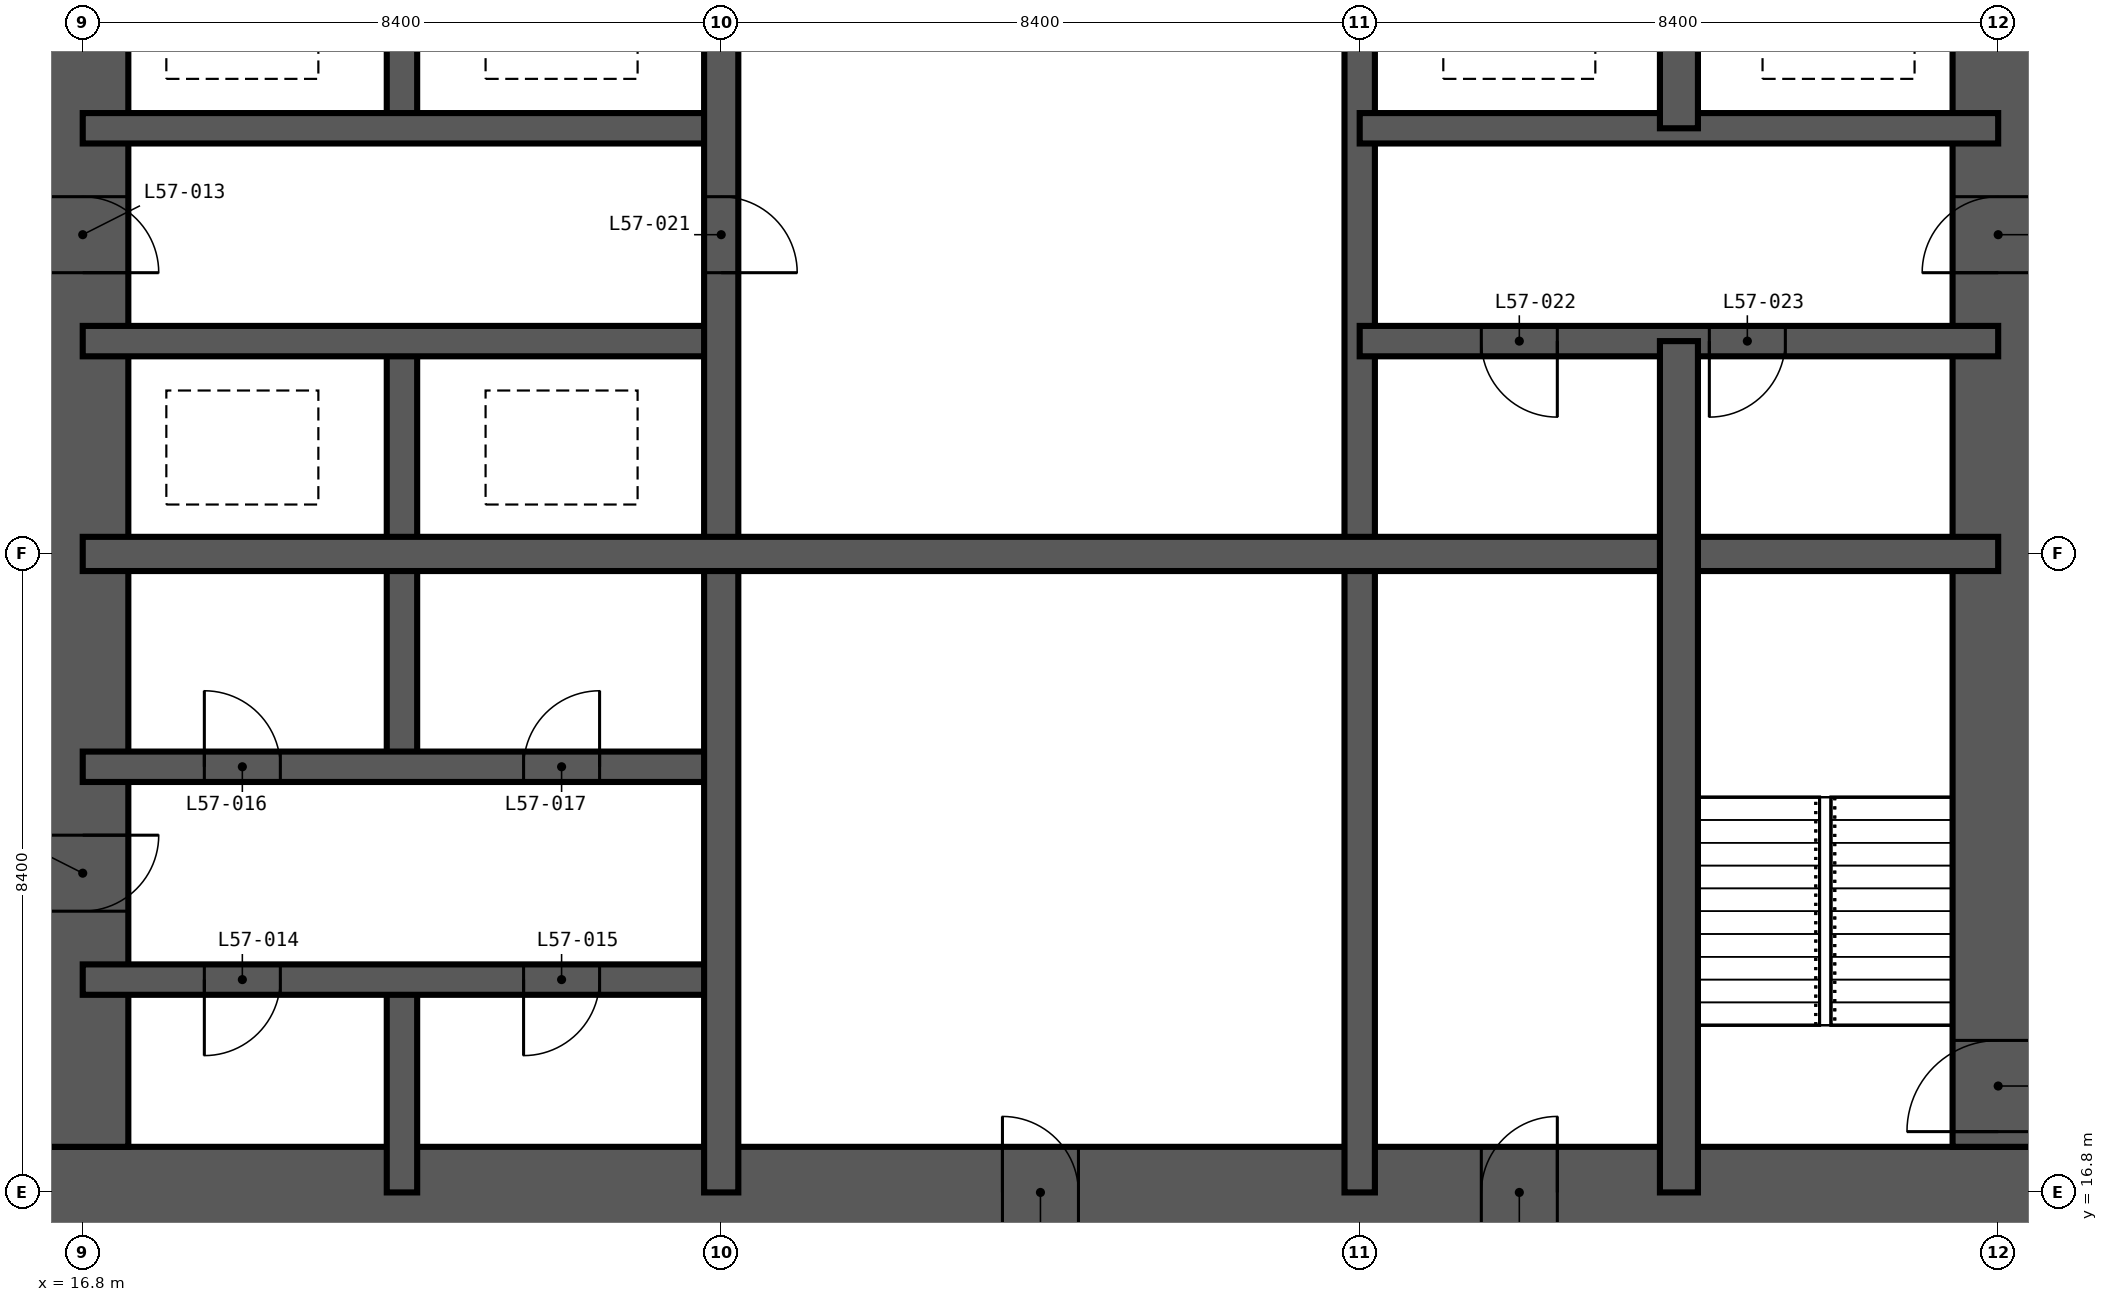
"""IFC4 building model, lengths in metres.
Left out: names, types, materials, properties, quantities, classifications, styles, units other than length and angle.
Written with IfcOpenShell. Run it as: python <this file> out.ifc"""

import sys

from ifc_helpers import new_model, si_unit, direction, frame, frame_2d, origin, place, context, subcontext, project, spatial, rectangle, extrude, element, fill, save


model = new_model("IFC4")
c1 = context("Model", 3, precision=1e-05, world=origin(), true_north=direction((0.0, 1.0)))
c2 = subcontext(c1, "Body", "Model", "MODEL_VIEW")
j1 = project(units=[si_unit("LENGTHUNIT", "METRE"), si_unit("PLANEANGLEUNIT", "RADIAN")], contexts=[c1])
p1 = place(None, origin())
s1 = spatial("IfcSite", under=j1, at=p1, CompositionType="ELEMENT")
p2 = place(p1, origin())
s2 = spatial("IfcBuilding", under=s1, at=p2, CompositionType="ELEMENT")
p3 = place(p2, frame((0.0, 0.0, 220.2)))
s3 = spatial("IfcBuildingStorey", under=s2, at=p3, CompositionType="ELEMENT", Elevation=220.2)
p4 = place(p3, frame((16.2, 16.8, -0.4), z_axis=(0.0, 0.0, 1.0), x_axis=(1.0, 0.0, 0.0)))
e1 = element("IfcWall", 1, at=p4, inside=s3, PredefinedType="SHEAR", context=c2, shape_type="SweptSolid", body=[
    extrude(rectangle(XDim=26.4, YDim=1.2, at=frame_2d((13.2, 0.0))), origin(), (0.0, 0.0, 1.0), 5.45),
])
p5 = place(p4, frame((12.7, 0.0, 0.4)))
e2 = element("IfcOpeningElement", 2, at=p5, cuts=e1, PredefinedType="OPENING", context=c2, shape_type="SweptSolid", body=[
    extrude(rectangle(XDim=1.0, YDim=2.1, at=frame_2d((0.5, 1.05))), frame((0.0, 0.61, 0.0), z_axis=(0.0, -1.0, 0.0), x_axis=(1.0, 0.0, 0.0)), (0.0, 0.0, 1.0), 1.22),
])
p6 = place(p4, frame((19.0, 0.0, 0.4)))
e3 = element("IfcOpeningElement", 3, at=p6, cuts=e1, PredefinedType="OPENING", context=c2, shape_type="SweptSolid", body=[
    extrude(rectangle(XDim=1.0, YDim=2.1, at=frame_2d((0.5, 1.05))), frame((0.0, 0.61, 0.0), z_axis=(0.0, -1.0, 0.0), x_axis=(1.0, 0.0, 0.0)), (0.0, 0.0, 1.0), 1.22),
])
p7 = place(p3, frame((42.0, 17.4, -0.4), z_axis=(0.0, 0.0, 1.0), x_axis=(0.0, 1.0, 0.0)))
e4 = element("IfcWall", 4, at=p7, inside=s3, PredefinedType="SHEAR", context=c2, shape_type="SweptSolid", body=[
    extrude(rectangle(XDim=24.0, YDim=1.2, at=frame_2d((12.0, 0.0))), origin(), (0.0, 0.0, 1.0), 5.45),
])
p8 = place(p7, frame((0.2, 0.0, 0.4)))
e5 = element("IfcOpeningElement", 5, at=p8, cuts=e4, PredefinedType="OPENING", context=c2, shape_type="SweptSolid", body=[
    extrude(rectangle(XDim=1.2, YDim=2.2, at=frame_2d((0.6, 1.1))), frame((0.0, 0.61, 0.0), z_axis=(0.0, -1.0, 0.0), x_axis=(1.0, 0.0, 0.0)), (0.0, 0.0, 1.0), 1.22),
])
p9 = place(p7, frame((11.5, 0.0, 0.4)))
e6 = element("IfcOpeningElement", 6, at=p9, cuts=e4, PredefinedType="OPENING", context=c2, shape_type="SweptSolid", body=[
    extrude(rectangle(XDim=1.0, YDim=2.1, at=frame_2d((0.5, 1.05))), frame((0.0, 0.61, 0.0), z_axis=(0.0, -1.0, 0.0), x_axis=(1.0, 0.0, 0.0)), (0.0, 0.0, 1.0), 1.22),
])
p10 = place(p7, frame((19.9, 0.0, 0.4)))
e7 = element("IfcOpeningElement", 7, at=p10, cuts=e4, PredefinedType="OPENING", context=c2, shape_type="SweptSolid", body=[
    extrude(rectangle(XDim=1.0, YDim=2.1, at=frame_2d((0.5, 1.05))), frame((0.0, 0.61, 0.0), z_axis=(0.0, -1.0, 0.0), x_axis=(1.0, 0.0, 0.0)), (0.0, 0.0, 1.0), 1.22),
])
p11 = place(p3, frame((16.8, 41.4, -0.4), z_axis=(0.0, 0.0, 1.0), x_axis=(0.0, -1.0, 0.0)))
e8 = element("IfcWall", 8, at=p11, inside=s3, PredefinedType="SHEAR", context=c2, shape_type="SweptSolid", body=[
    extrude(rectangle(XDim=24.0, YDim=1.2, at=frame_2d((12.0, 0.0))), origin(), (0.0, 0.0, 1.0), 5.45),
])
p12 = place(p11, frame((11.5, 0.0, 0.4)))
e9 = element("IfcOpeningElement", 9, at=p12, cuts=e8, PredefinedType="OPENING", context=c2, shape_type="SweptSolid", body=[
    extrude(rectangle(XDim=1.0, YDim=2.1, at=frame_2d((0.5, 1.05))), frame((0.0, 0.61, 0.0), z_axis=(0.0, -1.0, 0.0), x_axis=(1.0, 0.0, 0.0)), (0.0, 0.0, 1.0), 1.22),
])
p13 = place(p11, frame((19.9, 0.0, 0.4)))
e10 = element("IfcOpeningElement", 10, at=p13, cuts=e8, PredefinedType="OPENING", context=c2, shape_type="SweptSolid", body=[
    extrude(rectangle(XDim=1.0, YDim=2.1, at=frame_2d((0.5, 1.05))), frame((0.0, 0.61, 0.0), z_axis=(0.0, -1.0, 0.0), x_axis=(1.0, 0.0, 0.0)), (0.0, 0.0, 1.0), 1.22),
])
p14 = place(p11, frame((5.2, 0.0, 0.4)))
e11 = element("IfcOpeningElement", 11, at=p14, cuts=e8, PredefinedType="OPENING", context=c2, shape_type="SweptSolid", body=[
    extrude(rectangle(XDim=1.0, YDim=2.1, at=frame_2d((0.5, 1.05))), frame((0.0, 0.61, 0.0), z_axis=(0.0, -1.0, 0.0), x_axis=(1.0, 0.0, 0.0)), (0.0, 0.0, 1.0), 1.22),
])
p15 = place(p3, frame((21.0, 16.8, -0.4), z_axis=(0.0, 0.0, 1.0), x_axis=(0.0, 1.0, 0.0)))
e12 = element("IfcWall", 12, at=p15, inside=s3, PredefinedType="SHEAR", context=c2, shape_type="SweptSolid", body=[
    extrude(rectangle(XDim=2.8, YDim=0.4, at=frame_2d((1.4, 0.0))), origin(), (0.0, 0.0, 1.0), 5.45),
])
p16 = place(p3, frame((21.0, 22.4, -0.4), z_axis=(0.0, 0.0, 1.0), x_axis=(0.0, 1.0, 0.0)))
e13 = element("IfcWall", 13, at=p16, inside=s3, PredefinedType="SHEAR", context=c2, shape_type="SweptSolid", body=[
    extrude(rectangle(XDim=5.6, YDim=0.4, at=frame_2d((2.8, 0.0))), origin(), (0.0, 0.0, 1.0), 5.45),
])
p17 = place(p3, frame((21.0, 30.8, -0.4), z_axis=(0.0, 0.0, 1.0), x_axis=(0.0, 1.0, 0.0)))
e14 = element("IfcWall", 14, at=p17, inside=s3, PredefinedType="SHEAR", context=c2, shape_type="SweptSolid", body=[
    extrude(rectangle(XDim=2.8, YDim=0.4, at=frame_2d((1.4, 0.0))), origin(), (0.0, 0.0, 1.0), 5.45),
])
p18 = place(p3, frame((33.6, 16.8, -0.4), z_axis=(0.0, 0.0, 1.0), x_axis=(0.0, 1.0, 0.0)))
e15 = element("IfcWall", 15, at=p18, inside=s3, PredefinedType="SHEAR", context=c2, shape_type="SweptSolid", body=[
    extrude(rectangle(XDim=25.2, YDim=0.4, at=frame_2d((12.6, 0.0))), origin(), (0.0, 0.0, 1.0), 5.45),
])
p19 = place(p18, frame((22.5, 0.0, 0.4)))
e16 = element("IfcOpeningElement", 16, at=p19, cuts=e15, PredefinedType="OPENING", context=c2, shape_type="SweptSolid", body=[
    extrude(rectangle(XDim=1.2, YDim=2.2, at=frame_2d((0.6, 1.1))), frame((0.0, 0.21, 0.0), z_axis=(0.0, -1.0, 0.0), x_axis=(1.0, 0.0, 0.0)), (0.0, 0.0, 1.0), 0.42),
])
p20 = place(p18, frame((18.3, 0.0, 0.4)))
e17 = element("IfcOpeningElement", 17, at=p20, cuts=e15, PredefinedType="OPENING", context=c2, shape_type="SweptSolid", body=[
    extrude(rectangle(XDim=1.2, YDim=2.2, at=frame_2d((0.6, 1.1))), frame((0.0, 0.21, 0.0), z_axis=(0.0, -1.0, 0.0), x_axis=(1.0, 0.0, 0.0)), (0.0, 0.0, 1.0), 0.42),
])
p21 = place(p3, frame((16.8, 19.6, -0.4), z_axis=(0.0, 0.0, 1.0), x_axis=(1.0, 0.0, 0.0)))
e18 = element("IfcWall", 18, at=p21, inside=s3, PredefinedType="SHEAR", context=c2, shape_type="SweptSolid", body=[
    extrude(rectangle(XDim=8.4, YDim=0.4, at=frame_2d((4.2, 0.0))), origin(), (0.0, 0.0, 1.0), 5.45),
])
p22 = place(p21, frame((1.6, 0.0, 0.4)))
e19 = element("IfcOpeningElement", 19, at=p22, cuts=e18, PredefinedType="OPENING", context=c2, shape_type="SweptSolid", body=[
    extrude(rectangle(XDim=1.0, YDim=2.1, at=frame_2d((0.5, 1.05))), frame((0.0, 0.21, 0.0), z_axis=(0.0, -1.0, 0.0), x_axis=(1.0, 0.0, 0.0)), (0.0, 0.0, 1.0), 0.42),
])
p23 = place(p21, frame((5.8, 0.0, 0.4)))
e20 = element("IfcOpeningElement", 20, at=p23, cuts=e18, PredefinedType="OPENING", context=c2, shape_type="SweptSolid", body=[
    extrude(rectangle(XDim=1.0, YDim=2.1, at=frame_2d((0.5, 1.05))), frame((0.0, 0.21, 0.0), z_axis=(0.0, -1.0, 0.0), x_axis=(1.0, 0.0, 0.0)), (0.0, 0.0, 1.0), 0.42),
])
p24 = place(p3, frame((16.8, 22.4, -0.4), z_axis=(0.0, 0.0, 1.0), x_axis=(1.0, 0.0, 0.0)))
e21 = element("IfcWall", 21, at=p24, inside=s3, PredefinedType="SHEAR", context=c2, shape_type="SweptSolid", body=[
    extrude(rectangle(XDim=8.4, YDim=0.4, at=frame_2d((4.2, 0.0))), origin(), (0.0, 0.0, 1.0), 5.45),
])
p25 = place(p24, frame((1.6, 0.0, 0.4)))
e22 = element("IfcOpeningElement", 22, at=p25, cuts=e21, PredefinedType="OPENING", context=c2, shape_type="SweptSolid", body=[
    extrude(rectangle(XDim=1.0, YDim=2.1, at=frame_2d((0.5, 1.05))), frame((0.0, 0.21, 0.0), z_axis=(0.0, -1.0, 0.0), x_axis=(1.0, 0.0, 0.0)), (0.0, 0.0, 1.0), 0.42),
])
p26 = place(p24, frame((5.8, 0.0, 0.4)))
e23 = element("IfcOpeningElement", 23, at=p26, cuts=e21, PredefinedType="OPENING", context=c2, shape_type="SweptSolid", body=[
    extrude(rectangle(XDim=1.0, YDim=2.1, at=frame_2d((0.5, 1.05))), frame((0.0, 0.21, 0.0), z_axis=(0.0, -1.0, 0.0), x_axis=(1.0, 0.0, 0.0)), (0.0, 0.0, 1.0), 0.42),
])
p27 = place(p3, frame((16.8, 28.0, -0.4), z_axis=(0.0, 0.0, 1.0), x_axis=(1.0, 0.0, 0.0)))
e24 = element("IfcWall", 24, at=p27, inside=s3, PredefinedType="SHEAR", context=c2, shape_type="SweptSolid", body=[
    extrude(rectangle(XDim=8.4, YDim=0.4, at=frame_2d((4.2, 0.0))), origin(), (0.0, 0.0, 1.0), 5.45),
])
p28 = place(p3, frame((33.6, 28.0, -0.4), z_axis=(0.0, 0.0, 1.0), x_axis=(1.0, 0.0, 0.0)))
e25 = element("IfcWall", 25, at=p28, inside=s3, PredefinedType="SHEAR", context=c2, shape_type="SweptSolid", body=[
    extrude(rectangle(XDim=8.4, YDim=0.4, at=frame_2d((4.2, 0.0))), origin(), (0.0, 0.0, 1.0), 5.45),
])
p29 = place(p28, frame((1.6, 0.0, 0.4)))
e26 = element("IfcOpeningElement", 26, at=p29, cuts=e25, PredefinedType="OPENING", context=c2, shape_type="SweptSolid", body=[
    extrude(rectangle(XDim=1.0, YDim=2.1, at=frame_2d((0.5, 1.05))), frame((0.0, 0.21, 0.0), z_axis=(0.0, -1.0, 0.0), x_axis=(1.0, 0.0, 0.0)), (0.0, 0.0, 1.0), 0.42),
])
p30 = place(p28, frame((4.6, 0.0, 0.4)))
e27 = element("IfcOpeningElement", 27, at=p30, cuts=e25, PredefinedType="OPENING", context=c2, shape_type="SweptSolid", body=[
    extrude(rectangle(XDim=1.0, YDim=2.1, at=frame_2d((0.5, 1.05))), frame((0.0, 0.21, 0.0), z_axis=(0.0, -1.0, 0.0), x_axis=(1.0, 0.0, 0.0)), (0.0, 0.0, 1.0), 0.42),
])
for number, where, z_axis, x_axis in (
    (28, (16.8, 30.8, -0.4), (0.0, 0.0, 1.0), (1.0, 0.0, 0.0)),
    (29, (33.6, 30.8, -0.4), (0.0, 0.0, 1.0), (1.0, 0.0, 0.0)),
):
    element("IfcWall", number, at=place(p3, frame(where, z_axis=z_axis, x_axis=x_axis)), inside=s3, PredefinedType="SHEAR", context=c2, shape_type="SweptSolid", body=[
        extrude(rectangle(XDim=8.4, YDim=0.4, at=frame_2d((4.2, 0.0))), origin(), (0.0, 0.0, 1.0), 5.45),
    ])
p31 = place(p3, frame((25.2, 16.8, -0.4), z_axis=(0.0, 0.0, 1.0), x_axis=(0.0, 1.0, 0.0)))
e30 = element("IfcWall", 30, at=p31, inside=s3, PredefinedType="SHEAR", context=c2, shape_type="SweptSolid", body=[
    extrude(rectangle(XDim=25.2, YDim=0.45, at=frame_2d((12.6, 0.0))), origin(), (0.0, 0.0, 1.0), 5.45),
])
p32 = place(p31, frame((12.1, 0.0, 0.4)))
e31 = element("IfcOpeningElement", 31, at=p32, cuts=e30, PredefinedType="OPENING", context=c2, shape_type="SweptSolid", body=[
    extrude(rectangle(XDim=1.0, YDim=2.1, at=frame_2d((0.5, 1.05))), frame((0.0, 0.235, 0.0), z_axis=(0.0, -1.0, 0.0), x_axis=(1.0, 0.0, 0.0)), (0.0, 0.0, 1.0), 0.47),
])
p33 = place(p3, frame((16.8, 25.2, -0.4), z_axis=(0.0, 0.0, 1.0), x_axis=(1.0, 0.0, 0.0)))
e32 = element("IfcWall", 32, at=p33, inside=s3, PredefinedType="SHEAR", context=c2, shape_type="SweptSolid", body=[
    extrude(rectangle(XDim=25.2, YDim=0.45, at=frame_2d((12.6, 0.0))), origin(), (0.0, 0.0, 1.0), 5.45),
])
p34 = place(p3, frame((37.8, 16.8, -0.4), z_axis=(0.0, 0.0, 1.0), x_axis=(0.0, 1.0, 0.0)))
e33 = element("IfcWall", 33, at=p34, inside=s3, PredefinedType="SHEAR", context=c2, shape_type="SweptSolid", body=[
    extrude(rectangle(XDim=11.2, YDim=0.5, at=frame_2d((5.6, 0.0))), origin(), (0.0, 0.0, 1.0), 5.45),
])
p35 = place(p3, frame((37.8, 30.8, -0.4), z_axis=(0.0, 0.0, 1.0), x_axis=(0.0, 1.0, 0.0)))
e34 = element("IfcWall", 34, at=p35, inside=s3, PredefinedType="SHEAR", context=c2, shape_type="SweptSolid", body=[
    extrude(rectangle(XDim=2.8, YDim=0.5, at=frame_2d((1.4, 0.0))), origin(), (0.0, 0.0, 1.0), 5.45),
])
p36 = place(p8, origin())
e35 = element("IfcDoor", 35, at=p36, inside=s3, OperationType="SINGLE_SWING_LEFT", PredefinedType="DOOR", context=c2, shape_type="SweptSolid", body=[
    extrude(rectangle(XDim=1.2, YDim=2.2, at=frame_2d((0.6, 1.1))), frame((0.0, 0.025, 0.0), z_axis=(0.0, -1.0, 0.0), x_axis=(1.0, 0.0, 0.0)), (0.0, 0.0, 1.0), 0.05),
])
fill(e5, e35)
p37 = place(p12, origin())
e36 = element("IfcDoor", 36, at=p37, inside=s3, OperationType="SINGLE_SWING_RIGHT", PredefinedType="DOOR", context=c2, shape_type="SweptSolid", body=[
    extrude(rectangle(XDim=1.0, YDim=2.1, at=frame_2d((0.5, 1.05))), frame((0.0, 0.025, 0.0), z_axis=(0.0, -1.0, 0.0), x_axis=(1.0, 0.0, 0.0)), (0.0, 0.0, 1.0), 0.05),
])
fill(e9, e36)
p38 = place(p22, frame((1.0, 0.0, 0.0), z_axis=(0.0, 0.0, 1.0), x_axis=(-1.0, 0.0, 0.0)))
e37 = element("IfcDoor", 37, at=p38, inside=s3, OperationType="SINGLE_SWING_RIGHT", PredefinedType="DOOR", context=c2, shape_type="SweptSolid", body=[
    extrude(rectangle(XDim=1.0, YDim=2.1, at=frame_2d((0.5, 1.05))), frame((0.0, 0.025, 0.0), z_axis=(0.0, -1.0, 0.0), x_axis=(1.0, 0.0, 0.0)), (0.0, 0.0, 1.0), 0.05),
])
fill(e19, e37)
p39 = place(p23, frame((1.0, 0.0, 0.0), z_axis=(0.0, 0.0, 1.0), x_axis=(-1.0, 0.0, 0.0)))
e38 = element("IfcDoor", 38, at=p39, inside=s3, OperationType="SINGLE_SWING_RIGHT", PredefinedType="DOOR", context=c2, shape_type="SweptSolid", body=[
    extrude(rectangle(XDim=1.0, YDim=2.1, at=frame_2d((0.5, 1.05))), frame((0.0, 0.025, 0.0), z_axis=(0.0, -1.0, 0.0), x_axis=(1.0, 0.0, 0.0)), (0.0, 0.0, 1.0), 0.05),
])
fill(e20, e38)
p40 = place(p25, origin())
e39 = element("IfcDoor", 39, at=p40, inside=s3, OperationType="SINGLE_SWING_LEFT", PredefinedType="DOOR", context=c2, shape_type="SweptSolid", body=[
    extrude(rectangle(XDim=1.0, YDim=2.1, at=frame_2d((0.5, 1.05))), frame((0.0, 0.025, 0.0), z_axis=(0.0, -1.0, 0.0), x_axis=(1.0, 0.0, 0.0)), (0.0, 0.0, 1.0), 0.05),
])
fill(e22, e39)
p41 = place(p26, origin())
e40 = element("IfcDoor", 40, at=p41, inside=s3, OperationType="SINGLE_SWING_RIGHT", PredefinedType="DOOR", context=c2, shape_type="SweptSolid", body=[
    extrude(rectangle(XDim=1.0, YDim=2.1, at=frame_2d((0.5, 1.05))), frame((0.0, 0.025, 0.0), z_axis=(0.0, -1.0, 0.0), x_axis=(1.0, 0.0, 0.0)), (0.0, 0.0, 1.0), 0.05),
])
fill(e23, e40)
p42 = place(p13, origin())
e41 = element("IfcDoor", 41, at=p42, inside=s3, OperationType="SINGLE_SWING_LEFT", PredefinedType="DOOR", context=c2, shape_type="SweptSolid", body=[
    extrude(rectangle(XDim=1.0, YDim=2.1, at=frame_2d((0.5, 1.05))), frame((0.0, 0.025, 0.0), z_axis=(0.0, -1.0, 0.0), x_axis=(1.0, 0.0, 0.0)), (0.0, 0.0, 1.0), 0.05),
])
fill(e10, e41)
p43 = place(p32, frame((1.0, 0.0, 0.0), z_axis=(0.0, 0.0, 1.0), x_axis=(-1.0, 0.0, 0.0)))
e42 = element("IfcDoor", 42, at=p43, inside=s3, OperationType="SINGLE_SWING_RIGHT", PredefinedType="DOOR", context=c2, shape_type="SweptSolid", body=[
    extrude(rectangle(XDim=1.0, YDim=2.1, at=frame_2d((0.5, 1.05))), frame((0.0, 0.025, 0.0), z_axis=(0.0, -1.0, 0.0), x_axis=(1.0, 0.0, 0.0)), (0.0, 0.0, 1.0), 0.05),
])
fill(e31, e42)
p44 = place(p29, frame((1.0, 0.0, 0.0), z_axis=(0.0, 0.0, 1.0), x_axis=(-1.0, 0.0, 0.0)))
e43 = element("IfcDoor", 43, at=p44, inside=s3, OperationType="SINGLE_SWING_LEFT", PredefinedType="DOOR", context=c2, shape_type="SweptSolid", body=[
    extrude(rectangle(XDim=1.0, YDim=2.1, at=frame_2d((0.5, 1.05))), frame((0.0, 0.025, 0.0), z_axis=(0.0, -1.0, 0.0), x_axis=(1.0, 0.0, 0.0)), (0.0, 0.0, 1.0), 0.05),
])
fill(e26, e43)
p45 = place(p30, frame((1.0, 0.0, 0.0), z_axis=(0.0, 0.0, 1.0), x_axis=(-1.0, 0.0, 0.0)))
e44 = element("IfcDoor", 44, at=p45, inside=s3, OperationType="SINGLE_SWING_RIGHT", PredefinedType="DOOR", context=c2, shape_type="SweptSolid", body=[
    extrude(rectangle(XDim=1.0, YDim=2.1, at=frame_2d((0.5, 1.05))), frame((0.0, 0.025, 0.0), z_axis=(0.0, -1.0, 0.0), x_axis=(1.0, 0.0, 0.0)), (0.0, 0.0, 1.0), 0.05),
])
fill(e27, e44)
p46 = place(p9, origin())
e45 = element("IfcDoor", 45, at=p46, inside=s3, OperationType="SINGLE_SWING_LEFT", PredefinedType="DOOR", context=c2, shape_type="SweptSolid", body=[
    extrude(rectangle(XDim=1.0, YDim=2.1, at=frame_2d((0.5, 1.05))), frame((0.0, 0.025, 0.0), z_axis=(0.0, -1.0, 0.0), x_axis=(1.0, 0.0, 0.0)), (0.0, 0.0, 1.0), 0.05),
])
fill(e6, e45)
p47 = place(p5, origin())
e46 = element("IfcDoor", 46, at=p47, inside=s3, OperationType="SINGLE_SWING_LEFT", PredefinedType="DOOR", context=c2, shape_type="SweptSolid", body=[
    extrude(rectangle(XDim=1.0, YDim=2.1, at=frame_2d((0.5, 1.05))), frame((0.0, 0.025, 0.0), z_axis=(0.0, -1.0, 0.0), x_axis=(1.0, 0.0, 0.0)), (0.0, 0.0, 1.0), 0.05),
])
fill(e2, e46)
p48 = place(p6, origin())
e47 = element("IfcDoor", 47, at=p48, inside=s3, OperationType="SINGLE_SWING_RIGHT", PredefinedType="DOOR", context=c2, shape_type="SweptSolid", body=[
    extrude(rectangle(XDim=1.0, YDim=2.1, at=frame_2d((0.5, 1.05))), frame((0.0, 0.025, 0.0), z_axis=(0.0, -1.0, 0.0), x_axis=(1.0, 0.0, 0.0)), (0.0, 0.0, 1.0), 0.05),
])
fill(e3, e47)
save(model, sys.argv[1])
